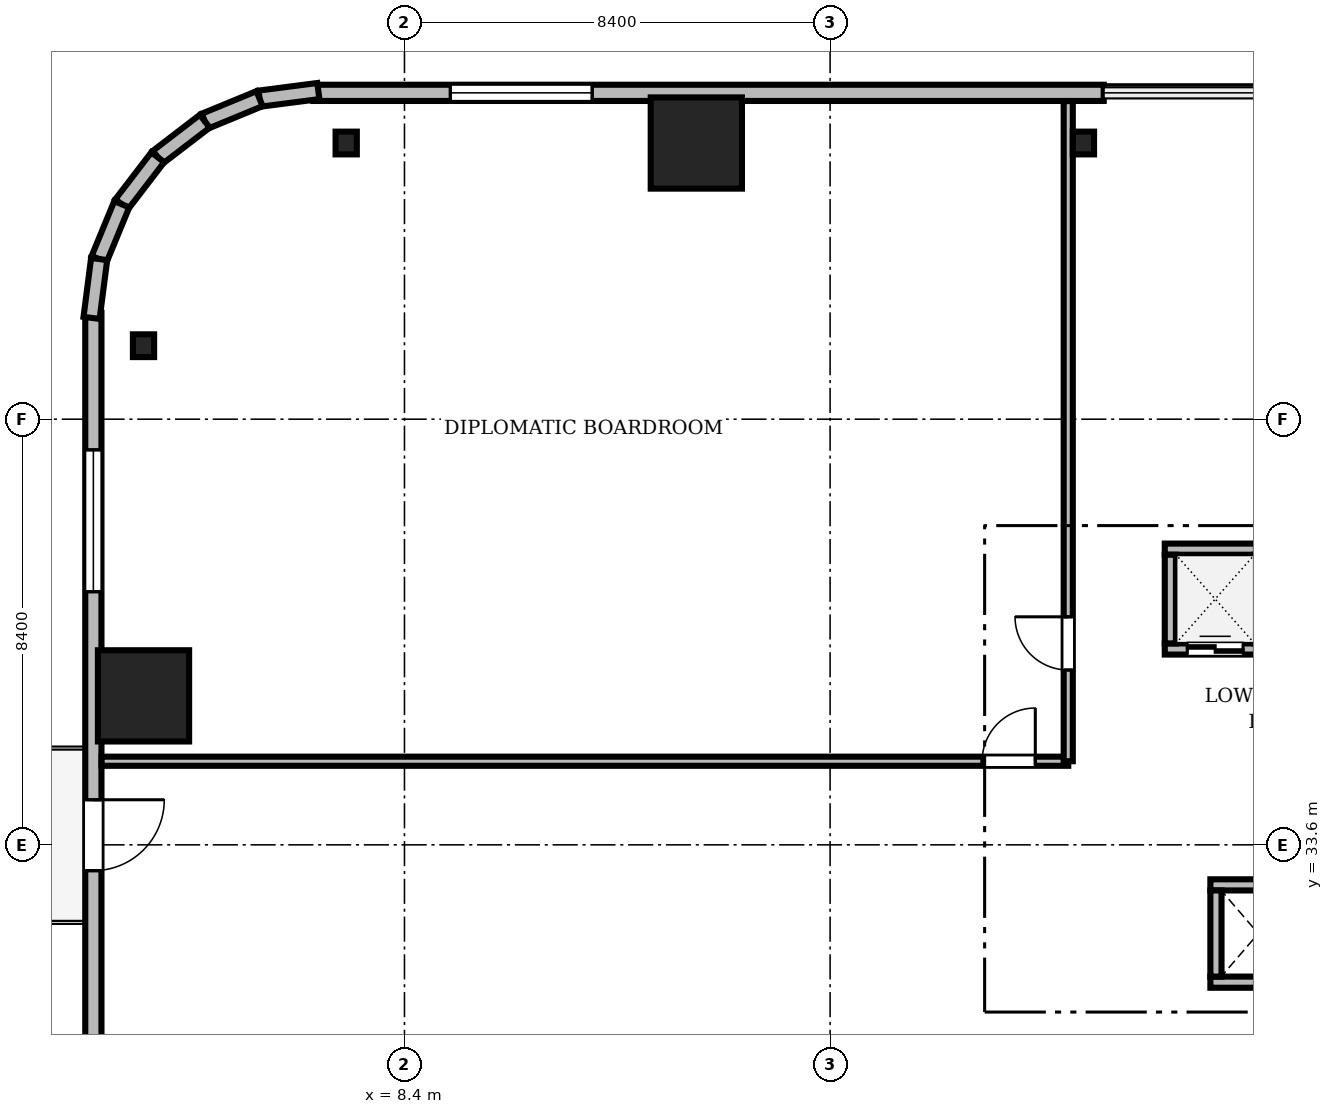
"""IFC4 building model, lengths in metres.
Left out: names, types, materials, properties, quantities, classifications, styles, units other than length and angle.
Written with IfcOpenShell. Run it as: python <this file> out.ifc"""

import sys

from ifc_helpers import new_model, si_unit, direction, frame, frame_2d, origin, origin_2d, place, context, subcontext, project, spatial, rectangle, i_section, extrude, source, transform, mapped, element, fill, save


model = new_model("IFC4")
c1 = context("Model", 3, precision=1e-05, world=origin(), true_north=direction((0.0, 1.0)))
c2 = subcontext(c1, "Body", "Model", "MODEL_VIEW")
j1 = project(units=[si_unit("LENGTHUNIT", "METRE"), si_unit("PLANEANGLEUNIT", "RADIAN")], contexts=[c1])
p1 = place(None, origin())
s1 = spatial("IfcSite", under=j1, at=p1, CompositionType="ELEMENT")
p2 = place(p1, origin())
s2 = spatial("IfcBuilding", under=s1, at=p2, CompositionType="ELEMENT")
p3 = place(p2, frame((0.0, 0.0, 34.9)))
s3 = spatial("IfcBuildingStorey", under=s2, at=p3, CompositionType="ELEMENT", Elevation=34.9)
m1 = source(origin(), c2, "Body", "SweptSolid", [
    extrude(rectangle(XDim=1.8, YDim=1.8, at=origin_2d()), origin(), (0.0, 0.0, 1.0), 3.41),
])
for number, where, z_axis, x_axis in (
    (1, (14.16, 47.45, 0.0), (0.0, 0.0, 1.0), (1.0, 0.0, 0.0)),
    (2, (3.25, 36.54, 0.0), (0.0, 0.0, 1.0), (1.0, 0.0, 0.0)),
):
    element("IfcColumn", number, at=place(p3, frame(where, z_axis=z_axis, x_axis=x_axis)), inside=s3, PredefinedType="COLUMN", context=c2, shape_type="MappedRepresentation", body=[
        mapped(m1, transform((0.0, 0.0, 0.0), scale=1.0)),
    ])
m2 = source(origin(), c2, "Body", "SweptSolid", [
    extrude(i_section(OverallWidth=0.419, OverallDepth=0.449, WebThickness=0.031, FlangeThickness=0.048, FilletRadius=0.015, at=origin_2d()), origin(), (0.0, 0.0, 1.0), 3.41),
])
for number, where, z_axis, x_axis in (
    (3, (21.8, 47.45, 0.0), (0.0, 0.0, 1.0), (1.0, 0.0, 0.0)),
    (4, (7.25, 47.45, 0.0), (0.0, 0.0, 1.0), (1.0, 0.0, 0.0)),
    (5, (3.25, 43.45, 0.0), (0.0, 0.0, 1.0), (1.0, 0.0, 0.0)),
):
    element("IfcColumn", number, at=place(p3, frame(where, z_axis=z_axis, x_axis=x_axis)), inside=s3, PredefinedType="COLUMN", context=c2, shape_type="MappedRepresentation", body=[
        mapped(m2, transform((0.0, 0.0, 0.0), scale=1.0)),
    ])
m3 = source(origin(), c2, "Body", "SweptSolid", [
    extrude(rectangle(XDim=15.6, YDim=0.32, at=frame_2d((7.8, 0.0))), origin(), (0.0, 0.0, 1.0), 3.41),
])
p4 = place(p3, frame((22.2, 48.44, 0.0), z_axis=(0.0, 0.0, 1.0), x_axis=(-1.0, 0.0, 0.0)))
e6 = element("IfcWall", 6, at=p4, inside=s3, PredefinedType="SOLIDWALL", context=c2, shape_type="MappedRepresentation", body=[
    mapped(m3, transform((0.0, 0.0, 0.0), scale=1.0)),
])
m4 = source(origin(), c2, "Body", "SweptSolid", [
    extrude(rectangle(XDim=2.8, YDim=2.4, at=frame_2d((1.4, 1.2))), frame((0.0, 0.17, 0.0), z_axis=(0.0, -1.0, 0.0), x_axis=(1.0, 0.0, 0.0)), (0.0, 0.0, 1.0), 0.34),
])
p5 = place(p4, frame((10.095, 0.0, 0.72)))
e7 = element("IfcOpeningElement", 7, at=p5, cuts=e6, PredefinedType="OPENING", context=c2, shape_type="MappedRepresentation", body=[
    mapped(m4, transform((0.0, 0.0, 0.0), scale=1.0)),
])
m5 = source(origin(), c2, "Body", "SweptSolid", [
    extrude(rectangle(XDim=15.6, YDim=0.32, at=frame_2d((7.8, 0.0))), origin(), (0.0, 0.0, 1.0), 3.41),
])
p6 = place(p3, frame((2.26, 44.1, 0.0), z_axis=(0.0, 0.0, 1.0), x_axis=(0.0, -1.0, 0.0)))
e8 = element("IfcWall", 8, at=p6, inside=s3, PredefinedType="SOLIDWALL", context=c2, shape_type="MappedRepresentation", body=[
    mapped(m5, transform((0.0, 0.0, 0.0), scale=1.0)),
])
m6 = source(origin(), c2, "Body", "SweptSolid", [
    extrude(rectangle(XDim=1.4, YDim=2.3, at=frame_2d((0.7, 1.15))), frame((0.0, 0.17, 0.0), z_axis=(0.0, -1.0, 0.0), x_axis=(1.0, 0.0, 0.0)), (0.0, 0.0, 1.0), 0.34),
])
p7 = place(p6, frame((9.61, 0.0, 0.0)))
e9 = element("IfcOpeningElement", 9, at=p7, cuts=e8, PredefinedType="OPENING", context=c2, shape_type="MappedRepresentation", body=[
    mapped(m6, transform((0.0, 0.0, 0.0), scale=1.0)),
])
p8 = place(p6, frame((2.705, 0.0, 0.72)))
e10 = element("IfcOpeningElement", 10, at=p8, cuts=e8, PredefinedType="OPENING", context=c2, shape_type="MappedRepresentation", body=[
    mapped(m4, transform((0.0, 0.0, 0.0), scale=1.0)),
])
m7 = source(origin(), c2, "Body", "SweptSolid", [
    extrude(rectangle(XDim=1.17, YDim=0.32, at=frame_2d((0.585, 0.0))), origin(), (0.0, 0.0, 1.0), 3.41),
])
p9 = place(p3, frame((6.7, 48.476, 0.0), z_axis=(0.0, 0.0, 1.0), x_axis=(-0.991735963317, -0.128295670475, 0.0)))
e11 = element("IfcWall", 11, at=p9, inside=s3, PredefinedType="SOLIDWALL", context=c2, shape_type="MappedRepresentation", body=[
    mapped(m7, transform((0.0, 0.0, 0.0), scale=1.0)),
])
m8 = source(origin(), c2, "Body", "SweptSolid", [
    extrude(rectangle(XDim=1.169, YDim=0.32, at=frame_2d((0.584, 0.0))), origin(), (0.0, 0.0, 1.0), 3.41),
])
p10 = place(p3, frame((5.54, 48.325, 0.0), z_axis=(0.0, 0.0, 1.0), x_axis=(-0.924552646638, -0.381054331552, 0.0)))
e12 = element("IfcWall", 12, at=p10, inside=s3, PredefinedType="SOLIDWALL", context=c2, shape_type="MappedRepresentation", body=[
    mapped(m8, transform((0.0, 0.0, 0.0), scale=1.0)),
])
m9 = source(origin(), c2, "Body", "SweptSolid", [
    extrude(rectangle(XDim=1.169, YDim=0.32, at=frame_2d((0.584, 0.0))), origin(), (0.0, 0.0, 1.0), 3.41),
])
p11 = place(p3, frame((4.459, 47.88, 0.0), z_axis=(0.0, 0.0, 1.0), x_axis=(-0.793663520347, -0.608356981114, 0.0)))
e13 = element("IfcWall", 13, at=p11, inside=s3, PredefinedType="SOLIDWALL", context=c2, shape_type="MappedRepresentation", body=[
    mapped(m9, transform((0.0, 0.0, 0.0), scale=1.0)),
])
m10 = source(origin(), c2, "Body", "SweptSolid", [
    extrude(rectangle(XDim=1.169, YDim=0.32, at=frame_2d((0.584, 0.0))), origin(), (0.0, 0.0, 1.0), 3.41),
])
p12 = place(p3, frame((3.531, 47.169, 0.0), z_axis=(0.0, 0.0, 1.0), x_axis=(-0.608387696831, -0.793639975269, 0.0)))
e14 = element("IfcWall", 14, at=p12, inside=s3, PredefinedType="SOLIDWALL", context=c2, shape_type="MappedRepresentation", body=[
    mapped(m10, transform((0.0, 0.0, 0.0), scale=1.0)),
])
p13 = place(p3, frame((2.82, 46.241, 0.0), z_axis=(0.0, 0.0, 1.0), x_axis=(-0.381054331552, -0.924552646638, 0.0)))
e15 = element("IfcWall", 15, at=p13, inside=s3, PredefinedType="SOLIDWALL", context=c2, shape_type="MappedRepresentation", body=[
    mapped(m8, transform((0.0, 0.0, 0.0), scale=1.0)),
])
p14 = place(p3, frame((2.375, 45.16, 0.0), z_axis=(0.0, 0.0, 1.0), x_axis=(-0.128295670475, -0.991735963317, 0.0)))
e16 = element("IfcWall", 16, at=p14, inside=s3, PredefinedType="SOLIDWALL", context=c2, shape_type="MappedRepresentation", body=[
    mapped(m7, transform((0.0, 0.0, 0.0), scale=1.0)),
])
m11 = source(origin(), c2, "Body", "SweptSolid", [
    extrude(rectangle(XDim=1.99, YDim=0.22, at=frame_2d((0.995, 0.0))), origin(), (0.0, 0.0, 1.0), 3.41),
])
p15 = place(p3, frame((23.405, 37.465, 0.0), z_axis=(0.0, 0.0, 1.0), x_axis=(1.0, 0.0, 0.0)))
e17 = element("IfcWall", 17, at=p15, inside=s3, PredefinedType="SOLIDWALL", context=c2, shape_type="MappedRepresentation", body=[
    mapped(m11, transform((0.0, 0.0, 0.0), scale=1.0)),
])
m12 = source(origin(), c2, "Body", "SweptSolid", [
    extrude(rectangle(XDim=1.1, YDim=2.2, at=frame_2d((0.55, 1.1))), frame((0.0, 0.12, 0.0), z_axis=(0.0, -1.0, 0.0), x_axis=(1.0, 0.0, 0.0)), (0.0, 0.0, 1.0), 0.24),
])
p16 = place(p15, frame((0.445, 0.0, 0.0)))
e18 = element("IfcOpeningElement", 18, at=p16, cuts=e17, PredefinedType="OPENING", context=c2, shape_type="MappedRepresentation", body=[
    mapped(m12, transform((0.0, 0.0, 0.0), scale=1.0)),
])
p17 = place(p3, frame((23.405, 39.435, 0.0), z_axis=(0.0, 0.0, 1.0), x_axis=(1.0, 0.0, 0.0)))
e19 = element("IfcWall", 19, at=p17, inside=s3, PredefinedType="SOLIDWALL", context=c2, shape_type="MappedRepresentation", body=[
    mapped(m11, transform((0.0, 0.0, 0.0), scale=1.0)),
])
m13 = source(origin(), c2, "Body", "SweptSolid", [
    extrude(rectangle(XDim=1.75, YDim=0.22, at=frame_2d((0.875, 0.0))), origin(), (0.0, 0.0, 1.0), 3.41),
])
p18 = place(p3, frame((23.515, 37.575, 0.0), z_axis=(0.0, 0.0, 1.0), x_axis=(0.0, 1.0, 0.0)))
e20 = element("IfcWall", 20, at=p18, inside=s3, PredefinedType="SOLIDWALL", context=c2, shape_type="MappedRepresentation", body=[
    mapped(m13, transform((0.0, 0.0, 0.0), scale=1.0)),
])
m14 = source(origin(), c2, "Body", "SweptSolid", [
    extrude(rectangle(XDim=1.89, YDim=0.22, at=frame_2d((0.945, 0.0))), origin(), (0.0, 0.0, 1.0), 3.41),
])
for number, where, z_axis, x_axis in (
    (21, (24.305, 30.89, 0.0), (0.0, 0.0, 1.0), (1.0, 0.0, 0.0)),
    (22, (24.305, 32.81, 0.0), (0.0, 0.0, 1.0), (1.0, 0.0, 0.0)),
):
    element("IfcWall", number, at=place(p3, frame(where, z_axis=z_axis, x_axis=x_axis)), inside=s3, PredefinedType="SOLIDWALL", context=c2, shape_type="MappedRepresentation", body=[
        mapped(m14, transform((0.0, 0.0, 0.0), scale=1.0)),
    ])
m15 = source(origin(), c2, "Body", "SweptSolid", [
    extrude(rectangle(XDim=1.7, YDim=0.22, at=frame_2d((0.85, 0.0))), origin(), (0.0, 0.0, 1.0), 3.41),
])
p19 = place(p3, frame((24.415, 31.0, 0.0), z_axis=(0.0, 0.0, 1.0), x_axis=(0.0, 1.0, 0.0)))
e23 = element("IfcWall", 23, at=p19, inside=s3, PredefinedType="SOLIDWALL", context=c2, shape_type="MappedRepresentation", body=[
    mapped(m15, transform((0.0, 0.0, 0.0), scale=1.0)),
])
m16 = source(origin(), c2, "Body", "SweptSolid", [
    extrude(rectangle(XDim=19.078, YDim=0.18, at=frame_2d((9.539, 0.0))), origin(), (0.0, 0.0, 1.0), 2.652),
])
p20 = place(p3, frame((2.422, 35.25, 0.0), z_axis=(0.0, 0.0, 1.0), x_axis=(1.0, 0.0, 0.0)))
e24 = element("IfcWall", 24, at=p20, inside=s3, PredefinedType="PARTITIONING", context=c2, shape_type="MappedRepresentation", body=[
    mapped(m16, transform((0.0, 0.0, 0.0), scale=1.0)),
])
m17 = source(origin(), c2, "Body", "SweptSolid", [
    extrude(rectangle(XDim=1.05, YDim=2.2, at=frame_2d((0.525, 1.1))), frame((0.0, 0.1, 0.0), z_axis=(0.0, -1.0, 0.0), x_axis=(1.0, 0.0, 0.0)), (0.0, 0.0, 1.0), 0.2),
])
p21 = place(p20, frame((17.378, 0.0, 0.0)))
e25 = element("IfcOpeningElement", 25, at=p21, cuts=e24, PredefinedType="OPENING", context=c2, shape_type="MappedRepresentation", body=[
    mapped(m17, transform((0.0, 0.0, 0.0), scale=1.0)),
])
m18 = source(origin(), c2, "Body", "SweptSolid", [
    extrude(rectangle(XDim=13.028, YDim=0.18, at=frame_2d((6.514, 0.0))), origin(), (0.0, 0.0, 1.0), 2.652),
])
p22 = place(p3, frame((21.5, 35.25, 0.0), z_axis=(0.0, 0.0, 1.0), x_axis=(0.0, 1.0, 0.0)))
e26 = element("IfcWall", 26, at=p22, inside=s3, PredefinedType="PARTITIONING", context=c2, shape_type="MappedRepresentation", body=[
    mapped(m18, transform((0.0, 0.0, 0.0), scale=1.0)),
])
p23 = place(p22, frame((1.8, 0.0, 0.0)))
e27 = element("IfcOpeningElement", 27, at=p23, cuts=e26, PredefinedType="OPENING", context=c2, shape_type="MappedRepresentation", body=[
    mapped(m17, transform((0.0, 0.0, 0.0), scale=1.0)),
])
m19 = source(origin(), c2, "Body", "SweptSolid", [
    extrude(rectangle(XDim=2.8, YDim=2.4, at=frame_2d((1.4, 1.2))), frame((0.0, 0.03, 0.0), z_axis=(0.0, -1.0, 0.0), x_axis=(1.0, 0.0, 0.0)), (0.0, 0.0, 1.0), 0.06),
])
p24 = place(p5, origin())
e28 = element("IfcWindow", 28, at=p24, inside=s3, PartitioningType="SINGLE_PANEL", PredefinedType="WINDOW", context=c2, shape_type="MappedRepresentation", body=[
    mapped(m19, transform((0.0, 0.0, 0.0), scale=1.0)),
])
fill(e7, e28)
m20 = source(origin(), c2, "Body", "SweptSolid", [
    extrude(rectangle(XDim=1.4, YDim=2.3, at=frame_2d((0.7, 1.15))), frame((0.0, 0.025, 0.0), z_axis=(0.0, -1.0, 0.0), x_axis=(1.0, 0.0, 0.0)), (0.0, 0.0, 1.0), 0.05),
])
p25 = place(p7, frame((1.4, 0.0, 0.0), z_axis=(0.0, 0.0, 1.0), x_axis=(-1.0, 0.0, 0.0)))
e29 = element("IfcDoor", 29, at=p25, inside=s3, OperationType="DOUBLE_DOOR_SLIDING", PredefinedType="DOOR", context=c2, shape_type="MappedRepresentation", body=[
    mapped(m20, transform((0.0, 0.0, 0.0), scale=1.0)),
])
fill(e9, e29)
p26 = place(p8, origin())
e30 = element("IfcWindow", 30, at=p26, inside=s3, PartitioningType="SINGLE_PANEL", PredefinedType="WINDOW", context=c2, shape_type="MappedRepresentation", body=[
    mapped(m19, transform((0.0, 0.0, 0.0), scale=1.0)),
])
fill(e10, e30)
m21 = source(origin(), c2, "Body", "SweptSolid", [
    extrude(rectangle(XDim=1.1, YDim=2.2, at=frame_2d((0.55, 1.1))), frame((0.0, 0.025, 0.0), z_axis=(0.0, -1.0, 0.0), x_axis=(1.0, 0.0, 0.0)), (0.0, 0.0, 1.0), 0.05),
])
p27 = place(p16, origin())
e31 = element("IfcDoor", 31, at=p27, inside=s3, OperationType="DOUBLE_DOOR_SLIDING", PredefinedType="DOOR", context=c2, shape_type="MappedRepresentation", body=[
    mapped(m21, transform((0.0, 0.0, 0.0), scale=1.0)),
])
fill(e18, e31)
m22 = source(origin(), c2, "Body", "SweptSolid", [
    extrude(rectangle(XDim=1.05, YDim=2.2, at=frame_2d((0.525, 1.1))), frame((0.0, 0.025, 0.0), z_axis=(0.0, -1.0, 0.0), x_axis=(1.0, 0.0, 0.0)), (0.0, 0.0, 1.0), 0.05),
])
p28 = place(p21, origin())
e32 = element("IfcDoor", 32, at=p28, inside=s3, OperationType="SINGLE_SWING_RIGHT", PredefinedType="DOOR", context=c2, shape_type="MappedRepresentation", body=[
    mapped(m22, transform((0.0, 0.0, 0.0), scale=1.0)),
])
fill(e25, e32)
p29 = place(p23, origin())
e33 = element("IfcDoor", 33, at=p29, inside=s3, OperationType="SINGLE_SWING_RIGHT", PredefinedType="DOOR", context=c2, shape_type="MappedRepresentation", body=[
    mapped(m22, transform((0.0, 0.0, 0.0), scale=1.0)),
])
fill(e27, e33)
save(model, sys.argv[1])
